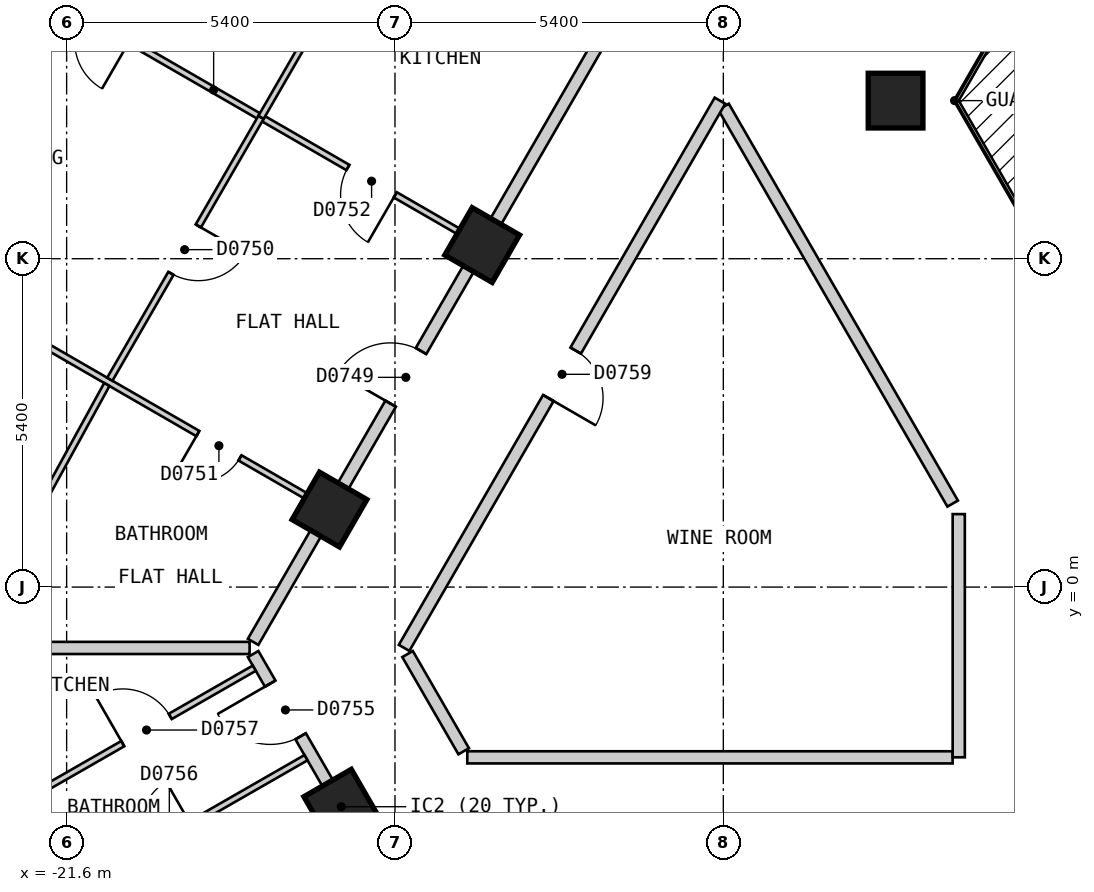
"""IFC4 building model, lengths in metres.
Left out: names, types, materials, properties, quantities, classifications, styles, units other than length and angle.
Written with IfcOpenShell. Run it as: python <this file> out.ifc"""

import sys

from ifc_helpers import new_model, si_unit, direction, frame, frame_2d, origin, origin_2d, place, context, subcontext, project, spatial, polyline, rectangle, outline, extrude, element, fill, save


model = new_model("IFC4")
c1 = context("Model", 3, precision=1e-05, world=origin(), true_north=direction((0.0, 1.0)))
c2 = subcontext(c1, "Body", "Model", "MODEL_VIEW")
j1 = project(units=[si_unit("LENGTHUNIT", "METRE"), si_unit("PLANEANGLEUNIT", "RADIAN")], contexts=[c1])
p1 = place(None, origin())
s1 = spatial("IfcSite", under=j1, at=p1, CompositionType="ELEMENT")
p2 = place(p1, origin())
s2 = spatial("IfcBuilding", under=s1, at=p2, CompositionType="ELEMENT")
p3 = place(p2, frame((0.0, 0.0, 105.0)))
s3 = spatial("IfcBuildingStorey", under=s2, at=p3, CompositionType="ELEMENT", Elevation=105.0)
for number, where, z_axis, x_axis in (
    (1, (-17.083, -3.612, 0.0), (0.0, 0.0, 1.0), (0.5, -0.866, 0.0)),
    (2, (-7.967, 8.0, 0.0), (0.0, 0.0, 1.0), (1.0, 0.0, 0.0)),
    (3, (-14.766, 5.625, 0.0), (0.0, 0.0, 1.0), (-0.5, -0.866, 0.0)),
    (4, (-17.277, 1.275, 0.0), (0.0, 0.0, 1.0), (-0.5, -0.866, 0.0)),
):
    element("IfcColumn", number, at=place(p3, frame(where, z_axis=z_axis, x_axis=x_axis)), inside=s3, PredefinedType="COLUMN", context=c2, shape_type="SweptSolid", body=[
        extrude(rectangle(XDim=0.9, YDim=0.9, at=origin_2d()), origin(), (0.0, 0.0, 1.0), 3.0),
    ])
p4 = place(p3, frame((-15.747, 24.425, 0.0), z_axis=(0.0, 0.0, 1.0), x_axis=(-0.500027479704, -0.866009537788, 0.0)))
e5 = element("IfcWall", 5, at=p4, inside=s3, PredefinedType="SOLIDWALL", context=c2, shape_type="SweptSolid", body=[
    extrude(outline(polyline([(0.0, -0.15), (26.559, -0.15), (26.478, 0.15), (0.08, 0.15), (0.0, -0.15)])), origin(), (0.0, 0.0, 1.0), 2.6),
])
p5 = place(p4, frame((1.227, 0.0, 0.15)))
e6 = element("IfcOpeningElement", 6, at=p5, cuts=e5, PredefinedType="OPENING", context=c2, shape_type="SweptSolid", body=[
    extrude(rectangle(XDim=1.5, YDim=2.1, at=frame_2d((0.75, 1.05))), frame((0.0, 0.16, 0.0), z_axis=(0.0, -1.0, 0.0), x_axis=(1.0, 0.0, 0.0)), (0.0, 0.0, 1.0), 0.32),
])
p6 = place(p4, frame((3.739, 0.0, 0.15)))
e7 = element("IfcOpeningElement", 7, at=p6, cuts=e5, PredefinedType="OPENING", context=c2, shape_type="SweptSolid", body=[
    extrude(rectangle(XDim=1.5, YDim=2.1, at=frame_2d((0.75, 1.05))), frame((0.0, 0.16, 0.0), z_axis=(0.0, -1.0, 0.0), x_axis=(1.0, 0.0, 0.0)), (0.0, 0.0, 1.0), 0.32),
])
p7 = place(p4, frame((6.25, 0.0, 0.15)))
e8 = element("IfcOpeningElement", 8, at=p7, cuts=e5, PredefinedType="OPENING", context=c2, shape_type="SweptSolid", body=[
    extrude(rectangle(XDim=1.5, YDim=2.1, at=frame_2d((0.75, 1.05))), frame((0.0, 0.16, 0.0), z_axis=(0.0, -1.0, 0.0), x_axis=(1.0, 0.0, 0.0)), (0.0, 0.0, 1.0), 0.32),
])
p8 = place(p4, frame((8.761, 0.0, 0.15)))
e9 = element("IfcOpeningElement", 9, at=p8, cuts=e5, PredefinedType="OPENING", context=c2, shape_type="SweptSolid", body=[
    extrude(rectangle(XDim=1.5, YDim=2.1, at=frame_2d((0.75, 1.05))), frame((0.0, 0.16, 0.0), z_axis=(0.0, -1.0, 0.0), x_axis=(1.0, 0.0, 0.0)), (0.0, 0.0, 1.0), 0.32),
])
p9 = place(p4, frame((11.273, 0.0, 0.15)))
e10 = element("IfcOpeningElement", 10, at=p9, cuts=e5, PredefinedType="OPENING", context=c2, shape_type="SweptSolid", body=[
    extrude(rectangle(XDim=1.5, YDim=2.1, at=frame_2d((0.75, 1.05))), frame((0.0, 0.16, 0.0), z_axis=(0.0, -1.0, 0.0), x_axis=(1.0, 0.0, 0.0)), (0.0, 0.0, 1.0), 0.32),
])
p10 = place(p4, frame((13.785, 0.0, 0.15)))
e11 = element("IfcOpeningElement", 11, at=p10, cuts=e5, PredefinedType="OPENING", context=c2, shape_type="SweptSolid", body=[
    extrude(rectangle(XDim=1.5, YDim=2.1, at=frame_2d((0.75, 1.05))), frame((0.0, 0.16, 0.0), z_axis=(0.0, -1.0, 0.0), x_axis=(1.0, 0.0, 0.0)), (0.0, 0.0, 1.0), 0.32),
])
p11 = place(p4, frame((16.296, 0.0, 0.15)))
e12 = element("IfcOpeningElement", 12, at=p11, cuts=e5, PredefinedType="OPENING", context=c2, shape_type="SweptSolid", body=[
    extrude(rectangle(XDim=1.5, YDim=2.1, at=frame_2d((0.75, 1.05))), frame((0.0, 0.16, 0.0), z_axis=(0.0, -1.0, 0.0), x_axis=(1.0, 0.0, 0.0)), (0.0, 0.0, 1.0), 0.32),
])
p12 = place(p4, frame((18.807, 0.0, 0.15)))
e13 = element("IfcOpeningElement", 13, at=p12, cuts=e5, PredefinedType="OPENING", context=c2, shape_type="SweptSolid", body=[
    extrude(rectangle(XDim=1.5, YDim=2.1, at=frame_2d((0.75, 1.05))), frame((0.0, 0.16, 0.0), z_axis=(0.0, -1.0, 0.0), x_axis=(1.0, 0.0, 0.0)), (0.0, 0.0, 1.0), 0.32),
])
p13 = place(p4, frame((21.319, 0.0, 0.15)))
e14 = element("IfcOpeningElement", 14, at=p13, cuts=e5, PredefinedType="OPENING", context=c2, shape_type="SweptSolid", body=[
    extrude(rectangle(XDim=1.5, YDim=2.1, at=frame_2d((0.75, 1.05))), frame((0.0, 0.16, 0.0), z_axis=(0.0, -1.0, 0.0), x_axis=(1.0, 0.0, 0.0)), (0.0, 0.0, 1.0), 0.32),
])
p14 = place(p4, frame((23.831, 0.0, 0.15)))
e15 = element("IfcOpeningElement", 15, at=p14, cuts=e5, PredefinedType="OPENING", context=c2, shape_type="SweptSolid", body=[
    extrude(rectangle(XDim=1.5, YDim=2.1, at=frame_2d((0.75, 1.05))), frame((0.0, 0.16, 0.0), z_axis=(0.0, -1.0, 0.0), x_axis=(1.0, 0.0, 0.0)), (0.0, 0.0, 1.0), 0.32),
])
p15 = place(p3, frame((-29.027, -3.425, 0.0), z_axis=(0.0, 0.0, 1.0), x_axis=(0.500035407905, -0.866004960056, 0.0)))
e16 = element("IfcWall", 16, at=p15, inside=s3, PredefinedType="SOLIDWALL", context=c2, shape_type="SweptSolid", body=[
    extrude(outline(polyline([(0.0, -0.15), (23.094, -0.15), (23.014, 0.15), (0.08, 0.15), (0.0, -0.15)])), origin(), (0.0, 0.0, 1.0), 2.6),
])
p16 = place(p15, frame((1.324, 0.0, 0.15)))
e17 = element("IfcOpeningElement", 17, at=p16, cuts=e16, PredefinedType="OPENING", context=c2, shape_type="SweptSolid", body=[
    extrude(rectangle(XDim=1.5, YDim=2.1, at=frame_2d((0.75, 1.05))), frame((0.0, 0.16, 0.0), z_axis=(0.0, -1.0, 0.0), x_axis=(1.0, 0.0, 0.0)), (0.0, 0.0, 1.0), 0.32),
])
p17 = place(p15, frame((4.031, 0.0, 0.15)))
e18 = element("IfcOpeningElement", 18, at=p17, cuts=e16, PredefinedType="OPENING", context=c2, shape_type="SweptSolid", body=[
    extrude(rectangle(XDim=1.5, YDim=2.1, at=frame_2d((0.75, 1.05))), frame((0.0, 0.16, 0.0), z_axis=(0.0, -1.0, 0.0), x_axis=(1.0, 0.0, 0.0)), (0.0, 0.0, 1.0), 0.32),
])
p18 = place(p15, frame((6.737, 0.0, 0.15)))
e19 = element("IfcOpeningElement", 19, at=p18, cuts=e16, PredefinedType="OPENING", context=c2, shape_type="SweptSolid", body=[
    extrude(rectangle(XDim=1.5, YDim=2.1, at=frame_2d((0.75, 1.05))), frame((0.0, 0.16, 0.0), z_axis=(0.0, -1.0, 0.0), x_axis=(1.0, 0.0, 0.0)), (0.0, 0.0, 1.0), 0.32),
])
p19 = place(p15, frame((9.444, 0.0, 0.15)))
e20 = element("IfcOpeningElement", 20, at=p19, cuts=e16, PredefinedType="OPENING", context=c2, shape_type="SweptSolid", body=[
    extrude(rectangle(XDim=1.5, YDim=2.1, at=frame_2d((0.75, 1.05))), frame((0.0, 0.16, 0.0), z_axis=(0.0, -1.0, 0.0), x_axis=(1.0, 0.0, 0.0)), (0.0, 0.0, 1.0), 0.32),
])
p20 = place(p15, frame((12.151, 0.0, 0.15)))
e21 = element("IfcOpeningElement", 21, at=p20, cuts=e16, PredefinedType="OPENING", context=c2, shape_type="SweptSolid", body=[
    extrude(rectangle(XDim=1.5, YDim=2.1, at=frame_2d((0.75, 1.05))), frame((0.0, 0.16, 0.0), z_axis=(0.0, -1.0, 0.0), x_axis=(1.0, 0.0, 0.0)), (0.0, 0.0, 1.0), 0.32),
])
p21 = place(p15, frame((14.857, 0.0, 0.15)))
e22 = element("IfcOpeningElement", 22, at=p21, cuts=e16, PredefinedType="OPENING", context=c2, shape_type="SweptSolid", body=[
    extrude(rectangle(XDim=1.5, YDim=2.1, at=frame_2d((0.75, 1.05))), frame((0.0, 0.16, 0.0), z_axis=(0.0, -1.0, 0.0), x_axis=(1.0, 0.0, 0.0)), (0.0, 0.0, 1.0), 0.32),
])
p22 = place(p15, frame((17.564, 0.0, 0.15)))
e23 = element("IfcOpeningElement", 23, at=p22, cuts=e16, PredefinedType="OPENING", context=c2, shape_type="SweptSolid", body=[
    extrude(rectangle(XDim=1.5, YDim=2.1, at=frame_2d((0.75, 1.05))), frame((0.0, 0.16, 0.0), z_axis=(0.0, -1.0, 0.0), x_axis=(1.0, 0.0, 0.0)), (0.0, 0.0, 1.0), 0.32),
])
p23 = place(p15, frame((20.27, 0.0, 0.15)))
e24 = element("IfcOpeningElement", 24, at=p23, cuts=e16, PredefinedType="OPENING", context=c2, shape_type="SweptSolid", body=[
    extrude(rectangle(XDim=1.5, YDim=2.1, at=frame_2d((0.75, 1.05))), frame((0.0, 0.16, 0.0), z_axis=(0.0, -1.0, 0.0), x_axis=(1.0, 0.0, 0.0)), (0.0, 0.0, 1.0), 0.32),
])
p24 = place(p3, frame((-10.796, 7.899, 0.0), z_axis=(0.0, 0.0, 1.0), x_axis=(0.500010383074, -0.866019409031, 0.0)))
e25 = element("IfcWall", 25, at=p24, inside=s3, PredefinedType="PARTITIONING", context=c2, shape_type="SweptSolid", body=[
    extrude(rectangle(XDim=7.535, YDim=0.2, at=frame_2d((3.768, 0.0))), origin(), (0.0, 0.0, 1.0), 2.6),
])
p25 = place(p3, frame((-15.993, -1.101, 0.0), z_axis=(0.0, 0.0, 1.0), x_axis=(0.499894174133, -0.866086493757, 0.0)))
e26 = element("IfcWall", 26, at=p25, inside=s3, PredefinedType="PARTITIONING", context=c2, shape_type="SweptSolid", body=[
    extrude(rectangle(XDim=1.846, YDim=0.2, at=frame_2d((0.923, 0.0))), origin(), (0.0, 0.0, 1.0), 2.6),
])
p26 = place(p3, frame((-18.533, -1.101, 0.0), z_axis=(0.0, 0.0, 1.0), x_axis=(0.500135180047, -0.865947343479, 0.0)))
e27 = element("IfcWall", 27, at=p26, inside=s3, PredefinedType="PARTITIONING", context=c2, shape_type="SweptSolid", body=[
    extrude(rectangle(XDim=2.799, YDim=0.2, at=frame_2d((1.399, 0.0))), origin(), (0.0, 0.0, 1.0), 2.6),
])
p27 = place(p26, frame((0.562, 0.0, 0.0)))
e28 = element("IfcOpeningElement", 28, at=p27, cuts=e27, PredefinedType="OPENING", context=c2, shape_type="SweptSolid", body=[
    extrude(rectangle(XDim=1.0, YDim=2.1, at=frame_2d((0.5, 1.05))), frame((0.0, 0.11, 0.0), z_axis=(0.0, -1.0, 0.0), x_axis=(1.0, 0.0, 0.0)), (0.0, 0.0, 1.0), 0.22),
])
p28 = place(p3, frame((-15.011, -2.8, 0.0), z_axis=(0.0, 0.0, 1.0), x_axis=(1.0, 0.0, 0.0)))
e29 = element("IfcWall", 29, at=p28, inside=s3, PredefinedType="PARTITIONING", context=c2, shape_type="SweptSolid", body=[
    extrude(rectangle(XDim=7.982, YDim=0.2, at=frame_2d((3.991, 0.0))), origin(), (0.0, 0.0, 1.0), 2.6),
])
p29 = place(p3, frame((-16.05, -1.0, 0.0), z_axis=(0.0, 0.0, 1.0), x_axis=(0.499962449088, 0.866047082728, 0.0)))
e30 = element("IfcWall", 30, at=p29, inside=s3, PredefinedType="PARTITIONING", context=c2, shape_type="SweptSolid", body=[
    extrude(rectangle(XDim=10.391, YDim=0.2, at=frame_2d((5.195, 0.0))), origin(), (0.0, 0.0, 1.0), 2.6),
])
p30 = place(p29, frame((4.745, 0.0, 0.0)))
e31 = element("IfcOpeningElement", 31, at=p30, cuts=e30, PredefinedType="OPENING", context=c2, shape_type="SweptSolid", body=[
    extrude(rectangle(XDim=0.9, YDim=2.1, at=frame_2d((0.45, 1.05))), frame((0.0, 0.11, 0.0), z_axis=(0.0, -1.0, 0.0), x_axis=(1.0, 0.0, 0.0)), (0.0, 0.0, 1.0), 0.22),
])
p31 = place(p3, frame((-18.533, -0.901, 0.0), z_axis=(0.0, 0.0, 1.0), x_axis=(0.499981198768, 0.866036258409, 0.0)))
e32 = element("IfcWall", 32, at=p31, inside=s3, PredefinedType="PARTITIONING", context=c2, shape_type="SweptSolid", body=[
    extrude(rectangle(XDim=20.093, YDim=0.2, at=frame_2d((10.046, 0.0))), origin(), (0.0, 0.0, 1.0), 2.6),
])
p32 = place(p31, frame((14.57, 0.0, 0.0)))
e33 = element("IfcOpeningElement", 33, at=p32, cuts=e32, PredefinedType="OPENING", context=c2, shape_type="SweptSolid", body=[
    extrude(rectangle(XDim=1.0, YDim=2.1, at=frame_2d((0.5, 1.05))), frame((0.0, 0.11, 0.0), z_axis=(0.0, -1.0, 0.0), x_axis=(1.0, 0.0, 0.0)), (0.0, 0.0, 1.0), 0.22),
])
p33 = place(p31, frame((4.523, 0.0, 0.0)))
e34 = element("IfcOpeningElement", 34, at=p33, cuts=e32, PredefinedType="OPENING", context=c2, shape_type="SweptSolid", body=[
    extrude(rectangle(XDim=1.0, YDim=2.1, at=frame_2d((0.5, 1.05))), frame((0.0, 0.11, 0.0), z_axis=(0.0, -1.0, 0.0), x_axis=(1.0, 0.0, 0.0)), (0.0, 0.0, 1.0), 0.22),
])
p34 = place(p3, frame((-6.928, -2.799, 0.0), z_axis=(0.0, 0.0, 1.0), x_axis=(0.0, 1.0, 0.0)))
e35 = element("IfcWall", 35, at=p34, inside=s3, PredefinedType="PARTITIONING", context=c2, shape_type="SweptSolid", body=[
    extrude(rectangle(XDim=3.999, YDim=0.2, at=frame_2d((2.0, 0.0))), origin(), (0.0, 0.0, 1.0), 2.6),
])
p35 = place(p3, frame((-26.025, 6.325, 0.0), z_axis=(0.0, 0.0, 1.0), x_axis=(0.866041268327, -0.499972520799, 0.0)))
e36 = element("IfcWall", 36, at=p35, inside=s3, PredefinedType="PARTITIONING", context=c2, shape_type="SweptSolid", body=[
    extrude(rectangle(XDim=10.0, YDim=0.1, at=frame_2d((5.0, 0.0))), origin(), (0.0, 0.0, 1.0), 2.6),
])
p36 = place(p35, frame((7.601, 0.0, 0.0)))
e37 = element("IfcOpeningElement", 37, at=p36, cuts=e36, PredefinedType="OPENING", context=c2, shape_type="SweptSolid", body=[
    extrude(rectangle(XDim=0.8, YDim=2.1, at=frame_2d((0.4, 1.05))), frame((0.0, 0.06, 0.0), z_axis=(0.0, -1.0, 0.0), x_axis=(1.0, 0.0, 0.0)), (0.0, 0.0, 1.0), 0.12),
])
p37 = place(p35, frame((2.5, 0.0, 0.0)))
e38 = element("IfcOpeningElement", 38, at=p37, cuts=e36, PredefinedType="OPENING", context=c2, shape_type="SweptSolid", body=[
    extrude(rectangle(XDim=0.9, YDim=2.1, at=frame_2d((0.45, 1.05))), frame((0.0, 0.06, 0.0), z_axis=(0.0, -1.0, 0.0), x_axis=(1.0, 0.0, 0.0)), (0.0, 0.0, 1.0), 0.12),
])
p38 = place(p3, frame((-23.513, 10.675, 0.0), z_axis=(0.0, 0.0, 1.0), x_axis=(0.866041268327, -0.499972520799, 0.0)))
e39 = element("IfcWall", 39, at=p38, inside=s3, PredefinedType="PARTITIONING", context=c2, shape_type="SweptSolid", body=[
    extrude(rectangle(XDim=10.0, YDim=0.1, at=frame_2d((5.0, 0.0))), origin(), (0.0, 0.0, 1.0), 2.6),
])
p39 = place(p38, frame((7.55, 0.0, 0.0)))
e40 = element("IfcOpeningElement", 40, at=p39, cuts=e39, PredefinedType="OPENING", context=c2, shape_type="SweptSolid", body=[
    extrude(rectangle(XDim=0.9, YDim=2.1, at=frame_2d((0.45, 1.05))), frame((0.0, 0.06, 0.0), z_axis=(0.0, -1.0, 0.0), x_axis=(1.0, 0.0, 0.0)), (0.0, 0.0, 1.0), 0.12),
])
p40 = place(p38, frame((2.5, 0.0, 0.0)))
e41 = element("IfcOpeningElement", 41, at=p40, cuts=e39, PredefinedType="OPENING", context=c2, shape_type="SweptSolid", body=[
    extrude(rectangle(XDim=0.9, YDim=2.1, at=frame_2d((0.45, 1.05))), frame((0.0, 0.06, 0.0), z_axis=(0.0, -1.0, 0.0), x_axis=(1.0, 0.0, 0.0)), (0.0, 0.0, 1.0), 0.12),
])
p41 = place(p3, frame((-20.89, 3.418, 0.0), z_axis=(0.0, 0.0, 1.0), x_axis=(0.500014231302, 0.866017187182, 0.0)))
e42 = element("IfcWall", 42, at=p41, inside=s3, PredefinedType="PARTITIONING", context=c2, shape_type="SweptSolid", body=[
    extrude(rectangle(XDim=4.973, YDim=0.1, at=frame_2d((2.487, 0.0))), origin(), (0.0, 0.0, 1.0), 2.6),
])
p42 = place(p41, frame((2.011, 0.0, 0.0)))
e43 = element("IfcOpeningElement", 43, at=p42, cuts=e42, PredefinedType="OPENING", context=c2, shape_type="SweptSolid", body=[
    extrude(rectangle(XDim=0.9, YDim=2.1, at=frame_2d((0.45, 1.05))), frame((0.0, 0.06, 0.0), z_axis=(0.0, -1.0, 0.0), x_axis=(1.0, 0.0, 0.0)), (0.0, 0.0, 1.0), 0.12),
])
p43 = place(p3, frame((-23.261, -0.901, 0.0), z_axis=(0.0, 0.0, 1.0), x_axis=(0.481037050261, 0.876700265927, 0.0)))
e44 = element("IfcWall", 44, at=p43, inside=s3, PredefinedType="PARTITIONING", context=c2, shape_type="SweptSolid", body=[
    extrude(rectangle(XDim=4.827, YDim=0.1, at=frame_2d((2.414, 0.0))), origin(), (0.0, 0.0, 1.0), 2.6),
])
p44 = place(p3, frame((-22.245, -5.435, 0.0), z_axis=(0.0, 0.0, 1.0), x_axis=(0.867311485465, 0.497765795511, 0.0)))
e45 = element("IfcWall", 45, at=p44, inside=s3, PredefinedType="PARTITIONING", context=c2, shape_type="SweptSolid", body=[
    extrude(rectangle(XDim=5.282, YDim=0.1, at=frame_2d((2.641, 0.0))), origin(), (0.0, 0.0, 1.0), 2.6),
])
p45 = place(p44, frame((2.291, 0.0, 0.0)))
e46 = element("IfcOpeningElement", 46, at=p45, cuts=e45, PredefinedType="OPENING", context=c2, shape_type="SweptSolid", body=[
    extrude(rectangle(XDim=0.8, YDim=2.1, at=frame_2d((0.4, 1.05))), frame((0.0, 0.06, 0.0), z_axis=(0.0, -1.0, 0.0), x_axis=(1.0, 0.0, 0.0)), (0.0, 0.0, 1.0), 0.12),
])
p46 = place(p3, frame((-22.094, -3.388, 0.0), z_axis=(0.0, 0.0, 1.0), x_axis=(0.867386440944, 0.497635169644, 0.0)))
e47 = element("IfcWall", 47, at=p46, inside=s3, PredefinedType="PARTITIONING", context=c2, shape_type="SweptSolid", body=[
    extrude(rectangle(XDim=4.127, YDim=0.1, at=frame_2d((2.064, 0.0))), origin(), (0.0, 0.0, 1.0), 2.6),
])
p47 = place(p46, frame((1.634, 0.0, 0.0)))
e48 = element("IfcOpeningElement", 48, at=p47, cuts=e47, PredefinedType="OPENING", context=c2, shape_type="SweptSolid", body=[
    extrude(rectangle(XDim=0.9, YDim=2.1, at=frame_2d((0.45, 1.05))), frame((0.0, 0.06, 0.0), z_axis=(0.0, -1.0, 0.0), x_axis=(1.0, 0.0, 0.0)), (0.0, 0.0, 1.0), 0.12),
])
p48 = place(p3, frame((-23.164, -1.001, 0.0), z_axis=(0.0, 0.0, 1.0), x_axis=(1.0, 0.0, 0.0)))
e49 = element("IfcWall", 49, at=p48, inside=s3, PredefinedType="PARTITIONING", context=c2, shape_type="SweptSolid", body=[
    extrude(rectangle(XDim=4.573, YDim=0.2, at=frame_2d((2.287, 0.0))), origin(), (0.0, 0.0, 1.0), 2.6),
])
p49 = place(p3, frame((-17.385, -3.786, 0.0), z_axis=(0.0, 0.0, 1.0), x_axis=(0.86668269741, 0.498859801958, 0.0)))
e50 = element("IfcWall", 50, at=p49, inside=s3, PredefinedType="PARTITIONING", context=c2, shape_type="SweptSolid", body=[
    extrude(rectangle(XDim=0.319, YDim=0.2, at=frame_2d((0.159, 0.0))), origin(), (0.0, 0.0, 1.0), 2.6),
])
p50 = place(p3, frame((-18.403, 7.725, 0.0), z_axis=(0.0, 0.0, 1.0), x_axis=(0.499995794706, 0.866027831699, 0.0)))
e51 = element("IfcWall", 51, at=p50, inside=s3, PredefinedType="PARTITIONING", context=c2, shape_type="SweptSolid", body=[
    extrude(rectangle(XDim=4.922, YDim=0.1, at=frame_2d((2.461, 0.0))), origin(), (0.0, 0.0, 1.0), 2.6),
])
p51 = place(p33, origin())
e52 = element("IfcDoor", 52, at=p51, inside=s3, OperationType="SINGLE_SWING_LEFT", PredefinedType="DOOR", context=c2, shape_type="SweptSolid", body=[
    extrude(rectangle(XDim=1.0, YDim=2.1, at=frame_2d((0.5, 1.05))), frame((0.0, 0.025, 0.0), z_axis=(0.0, -1.0, 0.0), x_axis=(1.0, 0.0, 0.0)), (0.0, 0.0, 1.0), 0.05),
])
fill(e34, e52)
p52 = place(p42, origin())
e53 = element("IfcDoor", 53, at=p52, inside=s3, OperationType="SINGLE_SWING_RIGHT", PredefinedType="DOOR", context=c2, shape_type="SweptSolid", body=[
    extrude(rectangle(XDim=0.9, YDim=2.1, at=frame_2d((0.45, 1.05))), frame((0.0, 0.025, 0.0), z_axis=(0.0, -1.0, 0.0), x_axis=(1.0, 0.0, 0.0)), (0.0, 0.0, 1.0), 0.05),
])
fill(e43, e53)
p53 = place(p36, origin())
e54 = element("IfcDoor", 54, at=p53, inside=s3, OperationType="SINGLE_SWING_LEFT", PredefinedType="DOOR", context=c2, shape_type="SweptSolid", body=[
    extrude(rectangle(XDim=0.8, YDim=2.1, at=frame_2d((0.4, 1.05))), frame((0.0, 0.025, 0.0), z_axis=(0.0, -1.0, 0.0), x_axis=(1.0, 0.0, 0.0)), (0.0, 0.0, 1.0), 0.05),
])
fill(e37, e54)
p54 = place(p39, origin())
e55 = element("IfcDoor", 55, at=p54, inside=s3, OperationType="SINGLE_SWING_RIGHT", PredefinedType="DOOR", context=c2, shape_type="SweptSolid", body=[
    extrude(rectangle(XDim=0.9, YDim=2.1, at=frame_2d((0.45, 1.05))), frame((0.0, 0.025, 0.0), z_axis=(0.0, -1.0, 0.0), x_axis=(1.0, 0.0, 0.0)), (0.0, 0.0, 1.0), 0.05),
])
fill(e40, e55)
p55 = place(p27, origin())
e56 = element("IfcDoor", 56, at=p55, inside=s3, OperationType="SINGLE_SWING_LEFT", PredefinedType="DOOR", context=c2, shape_type="SweptSolid", body=[
    extrude(rectangle(XDim=1.0, YDim=2.1, at=frame_2d((0.5, 1.05))), frame((0.0, 0.025, 0.0), z_axis=(0.0, -1.0, 0.0), x_axis=(1.0, 0.0, 0.0)), (0.0, 0.0, 1.0), 0.05),
])
fill(e28, e56)
p56 = place(p47, origin())
e57 = element("IfcDoor", 57, at=p56, inside=s3, OperationType="SINGLE_SWING_LEFT", PredefinedType="DOOR", context=c2, shape_type="SweptSolid", body=[
    extrude(rectangle(XDim=0.9, YDim=2.1, at=frame_2d((0.45, 1.05))), frame((0.0, 0.025, 0.0), z_axis=(0.0, -1.0, 0.0), x_axis=(1.0, 0.0, 0.0)), (0.0, 0.0, 1.0), 0.05),
])
fill(e48, e57)
p57 = place(p30, origin())
e58 = element("IfcDoor", 58, at=p57, inside=s3, OperationType="SINGLE_SWING_LEFT", PredefinedType="DOOR", context=c2, shape_type="SweptSolid", body=[
    extrude(rectangle(XDim=0.9, YDim=2.1, at=frame_2d((0.45, 1.05))), frame((0.0, 0.025, 0.0), z_axis=(0.0, -1.0, 0.0), x_axis=(1.0, 0.0, 0.0)), (0.0, 0.0, 1.0), 0.05),
])
fill(e31, e58)
save(model, sys.argv[1])
